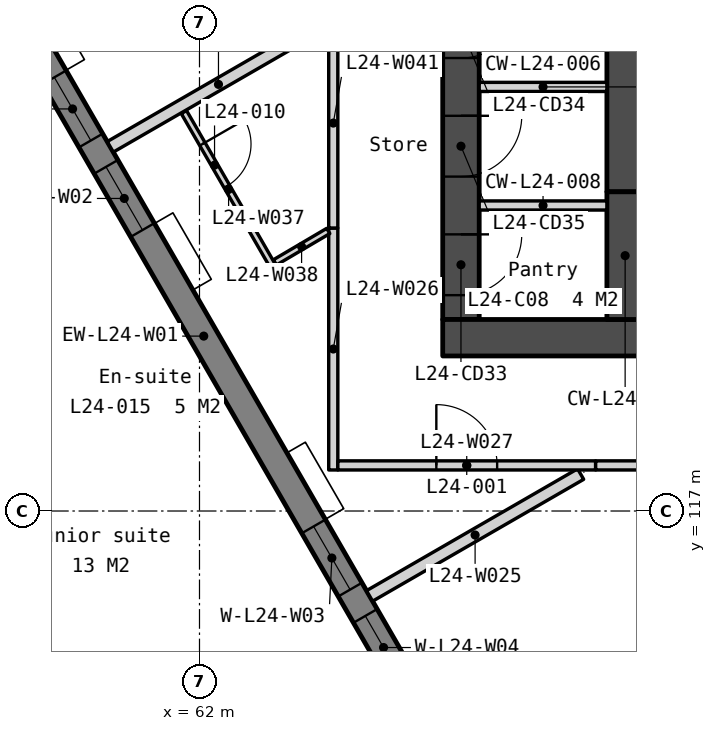
"""IFC4 building model, lengths in metres.
Left out: names, types, materials, properties, quantities, classifications, styles, units other than length and angle.
Written with IfcOpenShell. Run it as: python <this file> out.ifc"""

import sys

from ifc_helpers import new_model, si_unit, direction, frame, frame_2d, origin, place, context, subcontext, project, spatial, polyline, rectangle, outline, extrude, element, fill, save


model = new_model("IFC4")
c1 = context("Model", 3, precision=1e-05, world=origin(), true_north=direction((0.0, 1.0)))
c2 = subcontext(c1, "Body", "Model", "MODEL_VIEW")
j1 = project(units=[si_unit("LENGTHUNIT", "METRE"), si_unit("PLANEANGLEUNIT", "RADIAN")], contexts=[c1])
p1 = place(None, origin())
s1 = spatial("IfcSite", under=j1, at=p1, CompositionType="ELEMENT")
p2 = place(p1, origin())
s2 = spatial("IfcBuilding", under=s1, at=p2, CompositionType="ELEMENT")
p3 = place(p2, frame((0.0, 0.0, 99.3)))
s3 = spatial("IfcBuildingStorey", under=s2, at=p3, CompositionType="ELEMENT", Elevation=99.3)
p4 = place(p3, frame((66.3, 133.95, 0.0), z_axis=(0.0, 0.0, 1.0), x_axis=(0.0, -1.0, 0.0)))
e1 = element("IfcWall", 1, at=p4, inside=s3, PredefinedType="SOLIDWALL", context=c2, shape_type="SweptSolid", body=[
    extrude(rectangle(XDim=13.8, YDim=0.6, at=frame_2d((6.9, 0.0))), origin(), (0.0, 0.0, 1.0), 3.35),
])
p5 = place(p4, frame((0.6, 0.0, 0.0)))
e2 = element("IfcOpeningElement", 2, at=p5, cuts=e1, PredefinedType="OPENING", context=c2, shape_type="SweptSolid", body=[
    extrude(rectangle(XDim=1.1, YDim=2.1, at=frame_2d((0.55, 1.05))), frame((0.0, 0.31, 0.0), z_axis=(0.0, -1.0, 0.0), x_axis=(1.0, 0.0, 0.0)), (0.0, 0.0, 1.0), 0.62),
])
p6 = place(p4, frame((12.4, 0.0, 0.0)))
e3 = element("IfcOpeningElement", 3, at=p6, cuts=e1, PredefinedType="OPENING", context=c2, shape_type="SweptSolid", body=[
    extrude(rectangle(XDim=1.0, YDim=2.1, at=frame_2d((0.5, 1.05))), frame((0.0, 0.31, 0.0), z_axis=(0.0, -1.0, 0.0), x_axis=(1.0, 0.0, 0.0)), (0.0, 0.0, 1.0), 0.62),
])
p7 = place(p4, frame((8.5, 0.0, 0.0)))
e4 = element("IfcOpeningElement", 4, at=p7, cuts=e1, PredefinedType="OPENING", context=c2, shape_type="SweptSolid", body=[
    extrude(rectangle(XDim=1.0, YDim=2.1, at=frame_2d((0.5, 1.05))), frame((0.0, 0.31, 0.0), z_axis=(0.0, -1.0, 0.0), x_axis=(1.0, 0.0, 0.0)), (0.0, 0.0, 1.0), 0.62),
])
p8 = place(p4, frame((10.45, 0.0, 0.0)))
e5 = element("IfcOpeningElement", 5, at=p8, cuts=e1, PredefinedType="OPENING", context=c2, shape_type="SweptSolid", body=[
    extrude(rectangle(XDim=1.0, YDim=2.1, at=frame_2d((0.5, 1.05))), frame((0.0, 0.31, 0.0), z_axis=(0.0, -1.0, 0.0), x_axis=(1.0, 0.0, 0.0)), (0.0, 0.0, 1.0), 0.62),
])
p9 = place(p3, frame((66.0, 119.85, 0.0), z_axis=(0.0, 0.0, 1.0), x_axis=(1.0, 0.0, 0.0)))
e6 = element("IfcWall", 6, at=p9, inside=s3, PredefinedType="SOLIDWALL", context=c2, shape_type="SweptSolid", body=[
    extrude(rectangle(XDim=28.0, YDim=0.6, at=frame_2d((14.0, 0.0))), origin(), (0.0, 0.0, 1.0), 3.35),
])
p10 = place(p9, frame((6.825, 0.0, 0.0)))
e7 = element("IfcOpeningElement", 7, at=p10, cuts=e6, PredefinedType="OPENING", context=c2, shape_type="SweptSolid", body=[
    extrude(rectangle(XDim=1.8, YDim=2.1, at=frame_2d((0.9, 1.05))), frame((0.0, 0.31, 0.0), z_axis=(0.0, -1.0, 0.0), x_axis=(1.0, 0.0, 0.0)), (0.0, 0.0, 1.0), 0.62),
])
p11 = place(p9, frame((15.85, 0.0, 0.0)))
e8 = element("IfcOpeningElement", 8, at=p11, cuts=e6, PredefinedType="OPENING", context=c2, shape_type="SweptSolid", body=[
    extrude(rectangle(XDim=1.5, YDim=2.1, at=frame_2d((0.75, 1.05))), frame((0.0, 0.31, 0.0), z_axis=(0.0, -1.0, 0.0), x_axis=(1.0, 0.0, 0.0)), (0.0, 0.0, 1.0), 0.62),
])
p12 = place(p9, frame((19.375, 0.0, 0.0)))
e9 = element("IfcOpeningElement", 9, at=p12, cuts=e6, PredefinedType="OPENING", context=c2, shape_type="SweptSolid", body=[
    extrude(rectangle(XDim=1.8, YDim=2.1, at=frame_2d((0.9, 1.05))), frame((0.0, 0.31, 0.0), z_axis=(0.0, -1.0, 0.0), x_axis=(1.0, 0.0, 0.0)), (0.0, 0.0, 1.0), 0.62),
])
p13 = place(p9, frame((4.425, 0.0, 0.0)))
e10 = element("IfcOpeningElement", 10, at=p13, cuts=e6, PredefinedType="OPENING", context=c2, shape_type="SweptSolid", body=[
    extrude(rectangle(XDim=1.0, YDim=2.1, at=frame_2d((0.5, 1.05))), frame((0.0, 0.31, 0.0), z_axis=(0.0, -1.0, 0.0), x_axis=(1.0, 0.0, 0.0)), (0.0, 0.0, 1.0), 0.62),
])
p14 = place(p9, frame((9.925, 0.0, 0.0)))
e11 = element("IfcOpeningElement", 11, at=p14, cuts=e6, PredefinedType="OPENING", context=c2, shape_type="SweptSolid", body=[
    extrude(rectangle(XDim=1.0, YDim=2.1, at=frame_2d((0.5, 1.05))), frame((0.0, 0.31, 0.0), z_axis=(0.0, -1.0, 0.0), x_axis=(1.0, 0.0, 0.0)), (0.0, 0.0, 1.0), 0.62),
])
p15 = place(p9, frame((13.125, 0.0, 0.0)))
e12 = element("IfcOpeningElement", 12, at=p15, cuts=e6, PredefinedType="OPENING", context=c2, shape_type="SweptSolid", body=[
    extrude(rectangle(XDim=1.0, YDim=2.1, at=frame_2d((0.5, 1.05))), frame((0.0, 0.31, 0.0), z_axis=(0.0, -1.0, 0.0), x_axis=(1.0, 0.0, 0.0)), (0.0, 0.0, 1.0), 0.62),
])
p16 = place(p9, frame((21.725, 0.0, 0.0)))
e13 = element("IfcOpeningElement", 13, at=p16, cuts=e6, PredefinedType="OPENING", context=c2, shape_type="SweptSolid", body=[
    extrude(rectangle(XDim=1.0, YDim=2.1, at=frame_2d((0.5, 1.05))), frame((0.0, 0.31, 0.0), z_axis=(0.0, -1.0, 0.0), x_axis=(1.0, 0.0, 0.0)), (0.0, 0.0, 1.0), 0.62),
])
p17 = place(p9, frame((23.425, 0.0, 0.0)))
e14 = element("IfcOpeningElement", 14, at=p17, cuts=e6, PredefinedType="OPENING", context=c2, shape_type="SweptSolid", body=[
    extrude(rectangle(XDim=1.0, YDim=2.1, at=frame_2d((0.5, 1.05))), frame((0.0, 0.31, 0.0), z_axis=(0.0, -1.0, 0.0), x_axis=(1.0, 0.0, 0.0)), (0.0, 0.0, 1.0), 0.62),
])
for number, where, z_axis, x_axis in (
    (15, (66.6, 123.975, 0.0), (0.0, 0.0, 1.0), (1.0, 0.0, 0.0)),
    (16, (66.6, 122.025, 0.0), (0.0, 0.0, 1.0), (1.0, 0.0, 0.0)),
):
    element("IfcWall", number, at=place(p3, frame(where, z_axis=z_axis, x_axis=x_axis)), inside=s3, PredefinedType="PARTITIONING", context=c2, shape_type="SweptSolid", body=[
        extrude(rectangle(XDim=2.1, YDim=0.15, at=frame_2d((1.05, 0.0))), origin(), (0.0, 0.0, 1.0), 3.35),
    ])
p18 = place(p3, frame((69.15, 133.95, 0.0), z_axis=(0.0, 0.0, 1.0), x_axis=(0.0, -1.0, 0.0)))
e17 = element("IfcWall", 17, at=p18, inside=s3, PredefinedType="SOLIDWALL", context=c2, shape_type="SweptSolid", body=[
    extrude(rectangle(XDim=11.7, YDim=0.9, at=frame_2d((5.85, 0.0))), origin(), (0.0, 0.0, 1.0), 3.35),
])
p19 = place(p3, frame((69.0, 122.25, 0.0), z_axis=(0.0, 0.0, 1.0), x_axis=(0.0, -1.0, 0.0)))
e18 = element("IfcWall", 18, at=p19, inside=s3, PredefinedType="SOLIDWALL", context=c2, shape_type="SweptSolid", body=[
    extrude(rectangle(XDim=2.1, YDim=0.6, at=frame_2d((1.05, 0.0))), origin(), (0.0, 0.0, 1.0), 3.35),
])
p20 = place(p3, frame((56.073, 130.263, -0.15), z_axis=(0.0, 0.0, 1.0), x_axis=(0.500002343971, -0.866024050488, 0.0)))
e19 = element("IfcWall", 19, at=p20, inside=s3, PredefinedType="SOLIDWALL", context=c2, shape_type="SweptSolid", body=[
    extrude(outline(polyline([(0.0, 0.0), (0.0, 3.5), (23.986, 3.5), (23.986, 0.0), (0.0, 0.0)])), frame((0.0, 0.225, 0.0), z_axis=(0.0, -1.0, 0.0), x_axis=(1.0, 0.0, 0.0)), (0.0, 0.0, 1.0), 0.45),
])
p21 = place(p20, frame((7.079, 0.0, 1.05)))
e20 = element("IfcOpeningElement", 20, at=p21, cuts=e19, PredefinedType="OPENING", context=c2, shape_type="SweptSolid", body=[
    extrude(rectangle(XDim=1.2, YDim=1.5, at=frame_2d((0.6, 0.75))), frame((0.0, 0.235, 0.0), z_axis=(0.0, -1.0, 0.0), x_axis=(1.0, 0.0, 0.0)), (0.0, 0.0, 1.0), 0.47),
])
p22 = place(p20, frame((8.779, 0.0, 1.05)))
e21 = element("IfcOpeningElement", 21, at=p22, cuts=e19, PredefinedType="OPENING", context=c2, shape_type="SweptSolid", body=[
    extrude(rectangle(XDim=1.2, YDim=1.5, at=frame_2d((0.6, 0.75))), frame((0.0, 0.235, 0.0), z_axis=(0.0, -1.0, 0.0), x_axis=(1.0, 0.0, 0.0)), (0.0, 0.0, 1.0), 0.47),
])
p23 = place(p20, frame((15.607, 0.0, 1.05)))
e22 = element("IfcOpeningElement", 22, at=p23, cuts=e19, PredefinedType="OPENING", context=c2, shape_type="SweptSolid", body=[
    extrude(rectangle(XDim=1.2, YDim=1.5, at=frame_2d((0.6, 0.75))), frame((0.0, 0.235, 0.0), z_axis=(0.0, -1.0, 0.0), x_axis=(1.0, 0.0, 0.0)), (0.0, 0.0, 1.0), 0.47),
])
p24 = place(p20, frame((17.307, 0.0, 1.05)))
e23 = element("IfcOpeningElement", 23, at=p24, cuts=e19, PredefinedType="OPENING", context=c2, shape_type="SweptSolid", body=[
    extrude(rectangle(XDim=1.2, YDim=1.5, at=frame_2d((0.6, 0.75))), frame((0.0, 0.235, 0.0), z_axis=(0.0, -1.0, 0.0), x_axis=(1.0, 0.0, 0.0)), (0.0, 0.0, 1.0), 0.47),
])
p25 = place(p3, frame((64.797, 115.603, 0.0), z_axis=(0.0, 0.0, 1.0), x_axis=(0.866034462328, 0.499984309814, 0.0)))
e24 = element("IfcWall", 24, at=p25, inside=s3, PredefinedType="PARTITIONING", context=c2, shape_type="SweptSolid", body=[
    extrude(rectangle(XDim=4.009, YDim=0.2, at=frame_2d((2.004, 0.0))), origin(), (0.0, 0.0, 1.0), 3.35),
])
p26 = place(p3, frame((64.2, 117.675, 0.0), z_axis=(0.0, 0.0, 1.0), x_axis=(0.0, 1.0, 0.0)))
e25 = element("IfcWall", 25, at=p26, inside=s3, PredefinedType="PARTITIONING", context=c2, shape_type="SweptSolid", body=[
    extrude(rectangle(XDim=3.979, YDim=0.15, at=frame_2d((1.99, 0.0))), origin(), (0.0, 0.0, 1.0), 3.35),
])
p27 = place(p3, frame((64.275, 117.75, 0.0), z_axis=(0.0, 0.0, 1.0), x_axis=(1.0, 0.0, 0.0)))
e26 = element("IfcWall", 26, at=p27, inside=s3, PredefinedType="PARTITIONING", context=c2, shape_type="SweptSolid", body=[
    extrude(rectangle(XDim=4.24, YDim=0.15, at=frame_2d((2.12, 0.0))), origin(), (0.0, 0.0, 1.0), 3.35),
])
p28 = place(p27, frame((1.62, 0.0, 0.0)))
e27 = element("IfcOpeningElement", 27, at=p28, cuts=e26, PredefinedType="OPENING", context=c2, shape_type="SweptSolid", body=[
    extrude(rectangle(XDim=1.0, YDim=2.1, at=frame_2d((0.5, 1.05))), frame((0.0, 0.085, 0.0), z_axis=(0.0, -1.0, 0.0), x_axis=(1.0, 0.0, 0.0)), (0.0, 0.0, 1.0), 0.17),
])
p29 = place(p3, frame((68.515, 117.75, 0.0), z_axis=(0.0, 0.0, 1.0), x_axis=(1.0, 0.0, 0.0)))
e28 = element("IfcWall", 28, at=p29, inside=s3, PredefinedType="PARTITIONING", context=c2, shape_type="SweptSolid", body=[
    extrude(rectangle(XDim=3.991, YDim=0.15, at=frame_2d((1.996, 0.0))), origin(), (0.0, 0.0, 1.0), 3.35),
])
p30 = place(p29, frame((1.546, 0.0, 0.0)))
e29 = element("IfcOpeningElement", 29, at=p30, cuts=e28, PredefinedType="OPENING", context=c2, shape_type="SweptSolid", body=[
    extrude(rectangle(XDim=0.9, YDim=2.1, at=frame_2d((0.45, 1.05))), frame((0.0, 0.085, 0.0), z_axis=(0.0, -1.0, 0.0), x_axis=(1.0, 0.0, 0.0)), (0.0, 0.0, 1.0), 0.17),
])
p31 = place(p3, frame((61.743, 123.562, 0.0), z_axis=(0.0, 0.0, 1.0), x_axis=(0.500050696077, -0.865996132412, 0.0)))
e30 = element("IfcWall", 30, at=p31, inside=s3, PredefinedType="PARTITIONING", context=c2, shape_type="SweptSolid", body=[
    extrude(rectangle(XDim=2.94, YDim=0.1, at=frame_2d((1.47, 0.0))), origin(), (0.0, 0.0, 1.0), 3.35),
])
p32 = place(p31, frame((0.608, 0.0, 0.0)))
e31 = element("IfcOpeningElement", 31, at=p32, cuts=e30, PredefinedType="OPENING", context=c2, shape_type="SweptSolid", body=[
    extrude(rectangle(XDim=0.8, YDim=2.1, at=frame_2d((0.4, 1.05))), frame((0.0, 0.06, 0.0), z_axis=(0.0, -1.0, 0.0), x_axis=(1.0, 0.0, 0.0)), (0.0, 0.0, 1.0), 0.12),
])
p33 = place(p3, frame((63.24, 121.089, 0.0), z_axis=(0.0, 0.0, 1.0), x_axis=(0.861755507635, 0.507323806914, 0.0)))
e32 = element("IfcWall", 32, at=p33, inside=s3, PredefinedType="PARTITIONING", context=c2, shape_type="SweptSolid", body=[
    extrude(rectangle(XDim=1.019, YDim=0.1, at=frame_2d((0.509, 0.0))), origin(), (0.0, 0.0, 1.0), 3.35),
])
p34 = place(p3, frame((64.2, 121.654, 0.0), z_axis=(0.0, 0.0, 1.0), x_axis=(0.0, 1.0, 0.0)))
e33 = element("IfcWall", 33, at=p34, inside=s3, PredefinedType="PARTITIONING", context=c2, shape_type="SweptSolid", body=[
    extrude(rectangle(XDim=3.453, YDim=0.15, at=frame_2d((1.726, 0.0))), origin(), (0.0, 0.0, 1.0), 3.35),
])
p35 = place(p3, frame((60.532, 122.989, 0.0), z_axis=(0.0, 0.0, 1.0), x_axis=(0.866030279993, 0.499991554064, 0.0)))
e34 = element("IfcWall", 34, at=p35, inside=s3, PredefinedType="PARTITIONING", context=c2, shape_type="SweptSolid", body=[
    extrude(rectangle(XDim=4.11, YDim=0.2, at=frame_2d((2.055, 0.0))), origin(), (0.0, 0.0, 1.0), 3.35),
])
p36 = place(p6, origin())
e35 = element("IfcDoor", 35, at=p36, inside=s3, OperationType="SINGLE_SWING_LEFT", PredefinedType="DOOR", context=c2, shape_type="SweptSolid", body=[
    extrude(rectangle(XDim=1.0, YDim=2.1, at=frame_2d((0.5, 1.05))), frame((0.0, 0.025, 0.0), z_axis=(0.0, -1.0, 0.0), x_axis=(1.0, 0.0, 0.0)), (0.0, 0.0, 1.0), 0.05),
])
fill(e3, e35)
p37 = place(p7, origin())
e36 = element("IfcDoor", 36, at=p37, inside=s3, OperationType="SINGLE_SWING_LEFT", PredefinedType="DOOR", context=c2, shape_type="SweptSolid", body=[
    extrude(rectangle(XDim=1.0, YDim=2.1, at=frame_2d((0.5, 1.05))), frame((0.0, 0.025, 0.0), z_axis=(0.0, -1.0, 0.0), x_axis=(1.0, 0.0, 0.0)), (0.0, 0.0, 1.0), 0.05),
])
fill(e4, e36)
p38 = place(p8, origin())
e37 = element("IfcDoor", 37, at=p38, inside=s3, OperationType="SINGLE_SWING_LEFT", PredefinedType="DOOR", context=c2, shape_type="SweptSolid", body=[
    extrude(rectangle(XDim=1.0, YDim=2.1, at=frame_2d((0.5, 1.05))), frame((0.0, 0.025, 0.0), z_axis=(0.0, -1.0, 0.0), x_axis=(1.0, 0.0, 0.0)), (0.0, 0.0, 1.0), 0.05),
])
fill(e5, e37)
p39 = place(p21, origin())
e38 = element("IfcWindow", 38, at=p39, inside=s3, PartitioningType="SINGLE_PANEL", PredefinedType="WINDOW", context=c2, shape_type="SweptSolid", body=[
    extrude(rectangle(XDim=1.2, YDim=1.5, at=frame_2d((0.6, 0.75))), frame((0.0, 0.03, 0.0), z_axis=(0.0, -1.0, 0.0), x_axis=(1.0, 0.0, 0.0)), (0.0, 0.0, 1.0), 0.06),
])
fill(e20, e38)
p40 = place(p22, origin())
e39 = element("IfcWindow", 39, at=p40, inside=s3, PartitioningType="SINGLE_PANEL", PredefinedType="WINDOW", context=c2, shape_type="SweptSolid", body=[
    extrude(rectangle(XDim=1.2, YDim=1.5, at=frame_2d((0.6, 0.75))), frame((0.0, 0.03, 0.0), z_axis=(0.0, -1.0, 0.0), x_axis=(1.0, 0.0, 0.0)), (0.0, 0.0, 1.0), 0.06),
])
fill(e21, e39)
p41 = place(p23, origin())
e40 = element("IfcWindow", 40, at=p41, inside=s3, PartitioningType="SINGLE_PANEL", PredefinedType="WINDOW", context=c2, shape_type="SweptSolid", body=[
    extrude(rectangle(XDim=1.2, YDim=1.5, at=frame_2d((0.6, 0.75))), frame((0.0, 0.03, 0.0), z_axis=(0.0, -1.0, 0.0), x_axis=(1.0, 0.0, 0.0)), (0.0, 0.0, 1.0), 0.06),
])
fill(e22, e40)
p42 = place(p24, origin())
e41 = element("IfcWindow", 41, at=p42, inside=s3, PartitioningType="SINGLE_PANEL", PredefinedType="WINDOW", context=c2, shape_type="SweptSolid", body=[
    extrude(rectangle(XDim=1.2, YDim=1.5, at=frame_2d((0.6, 0.75))), frame((0.0, 0.03, 0.0), z_axis=(0.0, -1.0, 0.0), x_axis=(1.0, 0.0, 0.0)), (0.0, 0.0, 1.0), 0.06),
])
fill(e23, e41)
p43 = place(p28, origin())
e42 = element("IfcDoor", 42, at=p43, inside=s3, OperationType="SINGLE_SWING_LEFT", PredefinedType="DOOR", context=c2, shape_type="SweptSolid", body=[
    extrude(rectangle(XDim=1.0, YDim=2.1, at=frame_2d((0.5, 1.05))), frame((0.0, 0.025, 0.0), z_axis=(0.0, -1.0, 0.0), x_axis=(1.0, 0.0, 0.0)), (0.0, 0.0, 1.0), 0.05),
])
fill(e27, e42)
p44 = place(p32, origin())
e43 = element("IfcDoor", 43, at=p44, inside=s3, OperationType="SINGLE_SWING_LEFT", PredefinedType="DOOR", context=c2, shape_type="SweptSolid", body=[
    extrude(rectangle(XDim=0.8, YDim=2.1, at=frame_2d((0.4, 1.05))), frame((0.0, 0.025, 0.0), z_axis=(0.0, -1.0, 0.0), x_axis=(1.0, 0.0, 0.0)), (0.0, 0.0, 1.0), 0.05),
])
fill(e31, e43)
save(model, sys.argv[1])
